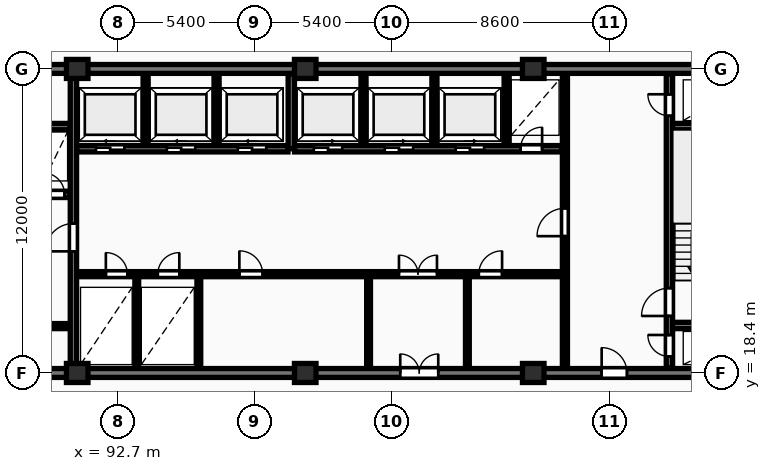
"""IFC4 building model, lengths in metres.
Left out: names, types, materials, properties, quantities, classifications, styles, units other than length and angle.
Written with IfcOpenShell. Run it as: python <this file> out.ifc"""

import sys

from ifc_helpers import new_model, si_unit, direction, frame, frame_2d, origin, origin_2d, place, context, subcontext, project, spatial, rectangle, extrude, element, fill, save


model = new_model("IFC4")
c1 = context("Model", 3, precision=1e-05, world=origin(), true_north=direction((0.0, 1.0)))
c2 = subcontext(c1, "Body", "Model", "MODEL_VIEW")
j1 = project(units=[si_unit("LENGTHUNIT", "METRE"), si_unit("PLANEANGLEUNIT", "RADIAN")], contexts=[c1])
p1 = place(None, origin())
s1 = spatial("IfcSite", under=j1, at=p1, CompositionType="ELEMENT")
p2 = place(p1, origin())
s2 = spatial("IfcBuilding", under=s1, at=p2, CompositionType="ELEMENT")
p3 = place(p2, frame((0.0, 0.0, 93.8)))
s3 = spatial("IfcBuildingStorey", under=s2, at=p3, CompositionType="ELEMENT", Elevation=93.8)
for number, where, z_axis, x_axis in (
    (1, (91.1, 18.4, 0.0), (0.0, 0.0, 1.0), (1.0, 0.0, 0.0)),
    (2, (91.1, 30.4, 0.0), (0.0, 0.0, 1.0), (1.0, 0.0, 0.0)),
    (3, (100.1, 18.4, 0.0), (0.0, 0.0, 1.0), (1.0, 0.0, 0.0)),
    (4, (100.1, 30.4, 0.0), (0.0, 0.0, 1.0), (1.0, 0.0, 0.0)),
    (5, (109.1, 18.4, 0.0), (0.0, 0.0, 1.0), (1.0, 0.0, 0.0)),
    (6, (109.1, 30.4, 0.0), (0.0, 0.0, 1.0), (1.0, 0.0, 0.0)),
):
    element("IfcColumn", number, at=place(p3, frame(where, z_axis=z_axis, x_axis=x_axis)), inside=s3, PredefinedType="COLUMN", context=c2, shape_type="SweptSolid", body=[
        extrude(rectangle(XDim=0.85, YDim=0.75, at=origin_2d()), origin(), (0.0, 0.0, 1.0), 3.25),
    ])
p4 = place(p3, frame((81.925, 30.4, 0.0), z_axis=(0.0, 0.0, 1.0), x_axis=(1.0, 0.0, 0.0)))
e7 = element("IfcWall", 7, at=p4, inside=s3, PredefinedType="SHEAR", context=c2, shape_type="SweptSolid", body=[
    extrude(rectangle(XDim=36.265, YDim=0.35, at=frame_2d((18.132, 0.0))), origin(), (0.0, 0.0, 1.0), 3.25),
])
p5 = place(p3, frame((81.925, 18.4, 0.0), z_axis=(0.0, 0.0, 1.0), x_axis=(1.0, 0.0, 0.0)))
e8 = element("IfcWall", 8, at=p5, inside=s3, PredefinedType="SHEAR", context=c2, shape_type="SweptSolid", body=[
    extrude(rectangle(XDim=36.265, YDim=0.35, at=frame_2d((18.132, 0.0))), origin(), (0.0, 0.0, 1.0), 3.25),
])
p6 = place(p5, frame((5.675, 0.0, 0.0)))
e9 = element("IfcOpeningElement", 9, at=p6, cuts=e8, PredefinedType="OPENING", context=c2, shape_type="SweptSolid", body=[
    extrude(rectangle(XDim=1.0, YDim=2.15, at=frame_2d((0.5, 1.075))), frame((0.0, 0.185, 0.0), z_axis=(0.0, -1.0, 0.0), x_axis=(1.0, 0.0, 0.0)), (0.0, 0.0, 1.0), 0.37),
])
p7 = place(p5, frame((21.925, 0.0, 0.0)))
e10 = element("IfcOpeningElement", 10, at=p7, cuts=e8, PredefinedType="OPENING", context=c2, shape_type="SweptSolid", body=[
    extrude(rectangle(XDim=1.5, YDim=2.2, at=frame_2d((0.75, 1.1))), frame((0.0, 0.185, 0.0), z_axis=(0.0, -1.0, 0.0), x_axis=(1.0, 0.0, 0.0)), (0.0, 0.0, 1.0), 0.37),
])
p8 = place(p5, frame((29.875, 0.0, 0.0)))
e11 = element("IfcOpeningElement", 11, at=p8, cuts=e8, PredefinedType="OPENING", context=c2, shape_type="SweptSolid", body=[
    extrude(rectangle(XDim=1.0, YDim=2.15, at=frame_2d((0.5, 1.075))), frame((0.0, 0.185, 0.0), z_axis=(0.0, -1.0, 0.0), x_axis=(1.0, 0.0, 0.0)), (0.0, 0.0, 1.0), 0.37),
])
p9 = place(p3, frame((83.0, 28.125, 0.0), z_axis=(0.0, 0.0, 1.0), x_axis=(1.0, 0.0, 0.0)))
e12 = element("IfcWall", 12, at=p9, inside=s3, PredefinedType="SHEAR", context=c2, shape_type="SweptSolid", body=[
    extrude(rectangle(XDim=7.82, YDim=0.25, at=frame_2d((3.91, 0.0))), origin(), (0.0, 0.0, 1.0), 3.25),
])
p10 = place(p3, frame((86.5, 25.45, 0.0), z_axis=(0.0, 0.0, 1.0), x_axis=(1.0, 0.0, 0.0)))
e13 = element("IfcWall", 13, at=p10, inside=s3, PredefinedType="SHEAR", context=c2, shape_type="SweptSolid", body=[
    extrude(rectangle(XDim=4.32, YDim=0.25, at=frame_2d((2.16, 0.0))), origin(), (0.0, 0.0, 1.0), 3.25),
])
p11 = place(p10, frame((1.14, 0.0, 0.0)))
e14 = element("IfcOpeningElement", 14, at=p11, cuts=e13, PredefinedType="OPENING", context=c2, shape_type="SweptSolid", body=[
    extrude(rectangle(XDim=1.12, YDim=2.12, at=frame_2d((0.56, 1.06))), frame((0.0, 0.135, 0.0), z_axis=(0.0, -1.0, 0.0), x_axis=(1.0, 0.0, 0.0)), (0.0, 0.0, 1.0), 0.27),
])
p12 = place(p10, frame((3.25, 0.0, 0.0)))
e15 = element("IfcOpeningElement", 15, at=p12, cuts=e13, PredefinedType="OPENING", context=c2, shape_type="SweptSolid", body=[
    extrude(rectangle(XDim=0.85, YDim=2.05, at=frame_2d((0.425, 1.025))), frame((0.0, 0.135, 0.0), z_axis=(0.0, -1.0, 0.0), x_axis=(1.0, 0.0, 0.0)), (0.0, 0.0, 1.0), 0.27),
])
p13 = place(p3, frame((86.5, 20.25, 0.0), z_axis=(0.0, 0.0, 1.0), x_axis=(1.0, 0.0, 0.0)))
e16 = element("IfcWall", 16, at=p13, inside=s3, PredefinedType="PARTITIONING", context=c2, shape_type="SweptSolid", body=[
    extrude(rectangle(XDim=4.32, YDim=0.2, at=frame_2d((2.16, 0.0))), origin(), (0.0, 0.0, 1.0), 2.97),
])
p14 = place(p13, frame((1.4, 0.0, 0.0)))
e17 = element("IfcOpeningElement", 17, at=p14, cuts=e16, PredefinedType="OPENING", context=c2, shape_type="SweptSolid", body=[
    extrude(rectangle(XDim=1.1, YDim=2.1, at=frame_2d((0.55, 1.05))), frame((0.0, 0.11, 0.0), z_axis=(0.0, -1.0, 0.0), x_axis=(1.0, 0.0, 0.0)), (0.0, 0.0, 1.0), 0.22),
])
p15 = place(p3, frame((90.95, 18.6, 0.0), z_axis=(0.0, 0.0, 1.0), x_axis=(0.0, 1.0, 0.0)))
e18 = element("IfcWall", 18, at=p15, inside=s3, PredefinedType="SHEAR", context=c2, shape_type="SweptSolid", body=[
    extrude(rectangle(XDim=11.6, YDim=0.25, at=frame_2d((5.8, 0.0))), origin(), (0.0, 0.0, 1.0), 3.25),
])
p16 = place(p15, frame((4.6, 0.0, 0.0)))
e19 = element("IfcOpeningElement", 19, at=p16, cuts=e18, PredefinedType="OPENING", context=c2, shape_type="SweptSolid", body=[
    extrude(rectangle(XDim=1.1, YDim=2.1, at=frame_2d((0.55, 1.05))), frame((0.0, 0.135, 0.0), z_axis=(0.0, -1.0, 0.0), x_axis=(1.0, 0.0, 0.0)), (0.0, 0.0, 1.0), 0.27),
])
for number, where, z_axis, x_axis in (
    (20, (93.8, 27.38, 0.0), (0.0, 0.0, 1.0), (0.0, 1.0, 0.0)),
    (21, (96.6, 27.38, 0.0), (0.0, 0.0, 1.0), (0.0, 1.0, 0.0)),
):
    element("IfcWall", number, at=place(p3, frame(where, z_axis=z_axis, x_axis=x_axis)), inside=s3, PredefinedType="PARTITIONING", context=c2, shape_type="SweptSolid", body=[
        extrude(rectangle(XDim=2.82, YDim=0.2, at=frame_2d((1.41, 0.0))), origin(), (0.0, 0.0, 1.0), 2.97),
    ])
p17 = place(p3, frame((91.08, 27.25, 0.0), z_axis=(0.0, 0.0, 1.0), x_axis=(1.0, 0.0, 0.0)))
e22 = element("IfcWall", 22, at=p17, inside=s3, PredefinedType="SHEAR", context=c2, shape_type="SweptSolid", body=[
    extrude(rectangle(XDim=8.34, YDim=0.25, at=frame_2d((4.17, 0.0))), origin(), (0.0, 0.0, 1.0), 3.25),
])
p18 = place(p17, frame((0.76, 0.0, 0.0)))
e23 = element("IfcOpeningElement", 23, at=p18, cuts=e22, PredefinedType="OPENING", context=c2, shape_type="SweptSolid", body=[
    extrude(rectangle(XDim=1.12, YDim=2.12, at=frame_2d((0.56, 1.06))), frame((0.0, 0.135, 0.0), z_axis=(0.0, -1.0, 0.0), x_axis=(1.0, 0.0, 0.0)), (0.0, 0.0, 1.0), 0.27),
])
p19 = place(p17, frame((3.56, 0.0, 0.0)))
e24 = element("IfcOpeningElement", 24, at=p19, cuts=e22, PredefinedType="OPENING", context=c2, shape_type="SweptSolid", body=[
    extrude(rectangle(XDim=1.12, YDim=2.12, at=frame_2d((0.56, 1.06))), frame((0.0, 0.135, 0.0), z_axis=(0.0, -1.0, 0.0), x_axis=(1.0, 0.0, 0.0)), (0.0, 0.0, 1.0), 0.27),
])
p20 = place(p17, frame((6.36, 0.0, 0.0)))
e25 = element("IfcOpeningElement", 25, at=p20, cuts=e22, PredefinedType="OPENING", context=c2, shape_type="SweptSolid", body=[
    extrude(rectangle(XDim=1.12, YDim=2.12, at=frame_2d((0.56, 1.06))), frame((0.0, 0.135, 0.0), z_axis=(0.0, -1.0, 0.0), x_axis=(1.0, 0.0, 0.0)), (0.0, 0.0, 1.0), 0.27),
])
p21 = place(p3, frame((99.55, 27.25, 0.0), z_axis=(0.0, 0.0, 1.0), x_axis=(0.0, 1.0, 0.0)))
e26 = element("IfcWall", 26, at=p21, inside=s3, PredefinedType="SHEAR", context=c2, shape_type="SweptSolid", body=[
    extrude(rectangle(XDim=2.95, YDim=0.25, at=frame_2d((1.475, 0.0))), origin(), (0.0, 0.0, 1.0), 3.25),
])
for number, where, z_axis, x_axis in (
    (27, (102.4, 27.38, 0.0), (0.0, 0.0, 1.0), (0.0, 1.0, 0.0)),
    (28, (105.2, 27.38, 0.0), (0.0, 0.0, 1.0), (0.0, 1.0, 0.0)),
    (29, (108.05, 27.38, 0.0), (0.0, 0.0, 1.0), (0.0, 1.0, 0.0)),
):
    element("IfcWall", number, at=place(p3, frame(where, z_axis=z_axis, x_axis=x_axis)), inside=s3, PredefinedType="PARTITIONING", context=c2, shape_type="SweptSolid", body=[
        extrude(rectangle(XDim=2.82, YDim=0.2, at=frame_2d((1.41, 0.0))), origin(), (0.0, 0.0, 1.0), 2.97),
    ])
p22 = place(p3, frame((99.68, 27.25, 0.0), z_axis=(0.0, 0.0, 1.0), x_axis=(1.0, 0.0, 0.0)))
e30 = element("IfcWall", 30, at=p22, inside=s3, PredefinedType="SHEAR", context=c2, shape_type="SweptSolid", body=[
    extrude(rectangle(XDim=10.54, YDim=0.25, at=frame_2d((5.27, 0.0))), origin(), (0.0, 0.0, 1.0), 3.25),
])
p23 = place(p22, frame((0.76, 0.0, 0.0)))
e31 = element("IfcOpeningElement", 31, at=p23, cuts=e30, PredefinedType="OPENING", context=c2, shape_type="SweptSolid", body=[
    extrude(rectangle(XDim=1.12, YDim=2.12, at=frame_2d((0.56, 1.06))), frame((0.0, 0.135, 0.0), z_axis=(0.0, -1.0, 0.0), x_axis=(1.0, 0.0, 0.0)), (0.0, 0.0, 1.0), 0.27),
])
p24 = place(p22, frame((3.56, 0.0, 0.0)))
e32 = element("IfcOpeningElement", 32, at=p24, cuts=e30, PredefinedType="OPENING", context=c2, shape_type="SweptSolid", body=[
    extrude(rectangle(XDim=1.12, YDim=2.12, at=frame_2d((0.56, 1.06))), frame((0.0, 0.135, 0.0), z_axis=(0.0, -1.0, 0.0), x_axis=(1.0, 0.0, 0.0)), (0.0, 0.0, 1.0), 0.27),
])
p25 = place(p22, frame((6.36, 0.0, 0.0)))
e33 = element("IfcOpeningElement", 33, at=p25, cuts=e30, PredefinedType="OPENING", context=c2, shape_type="SweptSolid", body=[
    extrude(rectangle(XDim=1.12, YDim=2.12, at=frame_2d((0.56, 1.06))), frame((0.0, 0.135, 0.0), z_axis=(0.0, -1.0, 0.0), x_axis=(1.0, 0.0, 0.0)), (0.0, 0.0, 1.0), 0.27),
])
p26 = place(p22, frame((8.92, 0.0, 0.0)))
e34 = element("IfcOpeningElement", 34, at=p26, cuts=e30, PredefinedType="OPENING", context=c2, shape_type="SweptSolid", body=[
    extrude(rectangle(XDim=0.85, YDim=2.05, at=frame_2d((0.425, 1.025))), frame((0.0, 0.135, 0.0), z_axis=(0.0, -1.0, 0.0), x_axis=(1.0, 0.0, 0.0)), (0.0, 0.0, 1.0), 0.27),
])
for number, where, z_axis, x_axis in (
    (35, (93.45, 18.6, 0.0), (0.0, 0.0, 1.0), (0.0, 1.0, 0.0)),
    (36, (95.9, 18.6, 0.0), (0.0, 0.0, 1.0), (0.0, 1.0, 0.0)),
    (37, (102.6, 18.6, 0.0), (0.0, 0.0, 1.0), (0.0, 1.0, 0.0)),
    (38, (106.5, 18.6, 0.0), (0.0, 0.0, 1.0), (0.0, 1.0, 0.0)),
):
    element("IfcWall", number, at=place(p3, frame(where, z_axis=z_axis, x_axis=x_axis)), inside=s3, PredefinedType="PARTITIONING", context=c2, shape_type="SweptSolid", body=[
        extrude(rectangle(XDim=3.6, YDim=0.15, at=frame_2d((1.8, 0.0))), origin(), (0.0, 0.0, 1.0), 2.97),
    ])
p27 = place(p3, frame((91.08, 22.3, 0.0), z_axis=(0.0, 0.0, 1.0), x_axis=(1.0, 0.0, 0.0)))
e39 = element("IfcWall", 39, at=p27, inside=s3, PredefinedType="PARTITIONING", context=c2, shape_type="SweptSolid", body=[
    extrude(rectangle(XDim=19.14, YDim=0.2, at=frame_2d((9.57, 0.0))), origin(), (0.0, 0.0, 1.0), 2.97),
])
p28 = place(p27, frame((1.15, 0.0, 0.0)))
e40 = element("IfcOpeningElement", 40, at=p28, cuts=e39, PredefinedType="OPENING", context=c2, shape_type="SweptSolid", body=[
    extrude(rectangle(XDim=0.85, YDim=2.05, at=frame_2d((0.425, 1.025))), frame((0.0, 0.11, 0.0), z_axis=(0.0, -1.0, 0.0), x_axis=(1.0, 0.0, 0.0)), (0.0, 0.0, 1.0), 0.22),
])
p29 = place(p27, frame((3.2, 0.0, 0.0)))
e41 = element("IfcOpeningElement", 41, at=p29, cuts=e39, PredefinedType="OPENING", context=c2, shape_type="SweptSolid", body=[
    extrude(rectangle(XDim=0.85, YDim=2.05, at=frame_2d((0.425, 1.025))), frame((0.0, 0.11, 0.0), z_axis=(0.0, -1.0, 0.0), x_axis=(1.0, 0.0, 0.0)), (0.0, 0.0, 1.0), 0.22),
])
p30 = place(p27, frame((12.72, 0.0, 0.0)))
e42 = element("IfcOpeningElement", 42, at=p30, cuts=e39, PredefinedType="OPENING", context=c2, shape_type="SweptSolid", body=[
    extrude(rectangle(XDim=1.5, YDim=2.2, at=frame_2d((0.75, 1.1))), frame((0.0, 0.11, 0.0), z_axis=(0.0, -1.0, 0.0), x_axis=(1.0, 0.0, 0.0)), (0.0, 0.0, 1.0), 0.22),
])
p31 = place(p27, frame((6.42, 0.0, 0.0)))
e43 = element("IfcOpeningElement", 43, at=p31, cuts=e39, PredefinedType="OPENING", context=c2, shape_type="SweptSolid", body=[
    extrude(rectangle(XDim=0.92, YDim=2.08, at=frame_2d((0.46, 1.04))), frame((0.0, 0.11, 0.0), z_axis=(0.0, -1.0, 0.0), x_axis=(1.0, 0.0, 0.0)), (0.0, 0.0, 1.0), 0.22),
])
p32 = place(p27, frame((15.87, 0.0, 0.0)))
e44 = element("IfcOpeningElement", 44, at=p32, cuts=e39, PredefinedType="OPENING", context=c2, shape_type="SweptSolid", body=[
    extrude(rectangle(XDim=0.92, YDim=2.08, at=frame_2d((0.46, 1.04))), frame((0.0, 0.11, 0.0), z_axis=(0.0, -1.0, 0.0), x_axis=(1.0, 0.0, 0.0)), (0.0, 0.0, 1.0), 0.22),
])
p33 = place(p3, frame((110.35, 18.6, 0.0), z_axis=(0.0, 0.0, 1.0), x_axis=(0.0, 1.0, 0.0)))
e45 = element("IfcWall", 45, at=p33, inside=s3, PredefinedType="PARTITIONING", context=c2, shape_type="SweptSolid", body=[
    extrude(rectangle(XDim=11.6, YDim=0.2, at=frame_2d((5.8, 0.0))), origin(), (0.0, 0.0, 1.0), 2.97),
])
p34 = place(p33, frame((5.2, 0.0, 0.0)))
e46 = element("IfcOpeningElement", 46, at=p34, cuts=e45, PredefinedType="OPENING", context=c2, shape_type="SweptSolid", body=[
    extrude(rectangle(XDim=1.1, YDim=2.15, at=frame_2d((0.55, 1.075))), frame((0.0, 0.11, 0.0), z_axis=(0.0, -1.0, 0.0), x_axis=(1.0, 0.0, 0.0)), (0.0, 0.0, 1.0), 0.22),
])
p35 = place(p3, frame((114.475, 18.6, 0.0), z_axis=(0.0, 0.0, 1.0), x_axis=(0.0, 1.0, 0.0)))
e47 = element("IfcWall", 47, at=p35, inside=s3, PredefinedType="SHEAR", context=c2, shape_type="SweptSolid", body=[
    extrude(rectangle(XDim=11.6, YDim=0.25, at=frame_2d((5.8, 0.0))), origin(), (0.0, 0.0, 1.0), 3.25),
])
p36 = place(p35, frame((0.45, 0.0, 0.0)))
e48 = element("IfcOpeningElement", 48, at=p36, cuts=e47, PredefinedType="OPENING", context=c2, shape_type="SweptSolid", body=[
    extrude(rectangle(XDim=0.85, YDim=2.05, at=frame_2d((0.425, 1.025))), frame((0.0, 0.135, 0.0), z_axis=(0.0, -1.0, 0.0), x_axis=(1.0, 0.0, 0.0)), (0.0, 0.0, 1.0), 0.27),
])
p37 = place(p35, frame((2.05, 0.0, 0.0)))
e49 = element("IfcOpeningElement", 49, at=p37, cuts=e47, PredefinedType="OPENING", context=c2, shape_type="SweptSolid", body=[
    extrude(rectangle(XDim=1.1, YDim=2.1, at=frame_2d((0.55, 1.05))), frame((0.0, 0.135, 0.0), z_axis=(0.0, -1.0, 0.0), x_axis=(1.0, 0.0, 0.0)), (0.0, 0.0, 1.0), 0.27),
])
p38 = place(p35, frame((9.95, 0.0, 0.0)))
e50 = element("IfcOpeningElement", 50, at=p38, cuts=e47, PredefinedType="OPENING", context=c2, shape_type="SweptSolid", body=[
    extrude(rectangle(XDim=0.85, YDim=2.05, at=frame_2d((0.425, 1.025))), frame((0.0, 0.135, 0.0), z_axis=(0.0, -1.0, 0.0), x_axis=(1.0, 0.0, 0.0)), (0.0, 0.0, 1.0), 0.27),
])
for number, where, z_axis, x_axis in (
    (51, (114.6, 20.275, 0.0), (0.0, 0.0, 1.0), (1.0, 0.0, 0.0)),
    (52, (114.6, 28.125, 0.0), (0.0, 0.0, 1.0), (1.0, 0.0, 0.0)),
):
    element("IfcWall", number, at=place(p3, frame(where, z_axis=z_axis, x_axis=x_axis)), inside=s3, PredefinedType="SHEAR", context=c2, shape_type="SweptSolid", body=[
        extrude(rectangle(XDim=3.24, YDim=0.25, at=frame_2d((1.62, 0.0))), origin(), (0.0, 0.0, 1.0), 3.25),
    ])
p39 = place(p7, origin())
e53 = element("IfcDoor", 53, at=p39, inside=s3, OperationType="DOUBLE_DOOR_SINGLE_SWING", PredefinedType="DOOR", context=c2, shape_type="SweptSolid", body=[
    extrude(rectangle(XDim=1.5, YDim=2.2, at=frame_2d((0.75, 1.1))), frame((0.0, 0.025, 0.0), z_axis=(0.0, -1.0, 0.0), x_axis=(1.0, 0.0, 0.0)), (0.0, 0.0, 1.0), 0.05),
])
fill(e10, e53)
p40 = place(p8, origin())
e54 = element("IfcDoor", 54, at=p40, inside=s3, OperationType="SINGLE_SWING_LEFT", PredefinedType="DOOR", context=c2, shape_type="SweptSolid", body=[
    extrude(rectangle(XDim=1.0, YDim=2.15, at=frame_2d((0.5, 1.075))), frame((0.0, 0.025, 0.0), z_axis=(0.0, -1.0, 0.0), x_axis=(1.0, 0.0, 0.0)), (0.0, 0.0, 1.0), 0.05),
])
fill(e11, e54)
p41 = place(p12, origin())
e55 = element("IfcDoor", 55, at=p41, inside=s3, OperationType="SINGLE_SWING_LEFT", PredefinedType="DOOR", context=c2, shape_type="SweptSolid", body=[
    extrude(rectangle(XDim=0.85, YDim=2.05, at=frame_2d((0.425, 1.025))), frame((0.0, 0.025, 0.0), z_axis=(0.0, -1.0, 0.0), x_axis=(1.0, 0.0, 0.0)), (0.0, 0.0, 1.0), 0.05),
])
fill(e15, e55)
p42 = place(p16, origin())
e56 = element("IfcDoor", 56, at=p42, inside=s3, OperationType="SINGLE_SWING_LEFT", PredefinedType="DOOR", context=c2, shape_type="SweptSolid", body=[
    extrude(rectangle(XDim=1.1, YDim=2.1, at=frame_2d((0.55, 1.05))), frame((0.0, 0.025, 0.0), z_axis=(0.0, -1.0, 0.0), x_axis=(1.0, 0.0, 0.0)), (0.0, 0.0, 1.0), 0.05),
])
fill(e19, e56)
p43 = place(p18, origin())
e57 = element("IfcDoor", 57, at=p43, inside=s3, OperationType="SLIDING_TO_LEFT", PredefinedType="DOOR", context=c2, shape_type="SweptSolid", body=[
    extrude(rectangle(XDim=1.12, YDim=2.12, at=frame_2d((0.56, 1.06))), frame((0.0, 0.025, 0.0), z_axis=(0.0, -1.0, 0.0), x_axis=(1.0, 0.0, 0.0)), (0.0, 0.0, 1.0), 0.05),
])
fill(e23, e57)
p44 = place(p19, origin())
e58 = element("IfcDoor", 58, at=p44, inside=s3, OperationType="SLIDING_TO_LEFT", PredefinedType="DOOR", context=c2, shape_type="SweptSolid", body=[
    extrude(rectangle(XDim=1.12, YDim=2.12, at=frame_2d((0.56, 1.06))), frame((0.0, 0.025, 0.0), z_axis=(0.0, -1.0, 0.0), x_axis=(1.0, 0.0, 0.0)), (0.0, 0.0, 1.0), 0.05),
])
fill(e24, e58)
p45 = place(p20, origin())
e59 = element("IfcDoor", 59, at=p45, inside=s3, OperationType="SLIDING_TO_LEFT", PredefinedType="DOOR", context=c2, shape_type="SweptSolid", body=[
    extrude(rectangle(XDim=1.12, YDim=2.12, at=frame_2d((0.56, 1.06))), frame((0.0, 0.025, 0.0), z_axis=(0.0, -1.0, 0.0), x_axis=(1.0, 0.0, 0.0)), (0.0, 0.0, 1.0), 0.05),
])
fill(e25, e59)
p46 = place(p23, origin())
e60 = element("IfcDoor", 60, at=p46, inside=s3, OperationType="SLIDING_TO_RIGHT", PredefinedType="DOOR", context=c2, shape_type="SweptSolid", body=[
    extrude(rectangle(XDim=1.12, YDim=2.12, at=frame_2d((0.56, 1.06))), frame((0.0, 0.025, 0.0), z_axis=(0.0, -1.0, 0.0), x_axis=(1.0, 0.0, 0.0)), (0.0, 0.0, 1.0), 0.05),
])
fill(e31, e60)
p47 = place(p24, origin())
e61 = element("IfcDoor", 61, at=p47, inside=s3, OperationType="SLIDING_TO_RIGHT", PredefinedType="DOOR", context=c2, shape_type="SweptSolid", body=[
    extrude(rectangle(XDim=1.12, YDim=2.12, at=frame_2d((0.56, 1.06))), frame((0.0, 0.025, 0.0), z_axis=(0.0, -1.0, 0.0), x_axis=(1.0, 0.0, 0.0)), (0.0, 0.0, 1.0), 0.05),
])
fill(e32, e61)
p48 = place(p25, origin())
e62 = element("IfcDoor", 62, at=p48, inside=s3, OperationType="SLIDING_TO_RIGHT", PredefinedType="DOOR", context=c2, shape_type="SweptSolid", body=[
    extrude(rectangle(XDim=1.12, YDim=2.12, at=frame_2d((0.56, 1.06))), frame((0.0, 0.025, 0.0), z_axis=(0.0, -1.0, 0.0), x_axis=(1.0, 0.0, 0.0)), (0.0, 0.0, 1.0), 0.05),
])
fill(e33, e62)
p49 = place(p26, origin())
e63 = element("IfcDoor", 63, at=p49, inside=s3, OperationType="SINGLE_SWING_RIGHT", PredefinedType="DOOR", context=c2, shape_type="SweptSolid", body=[
    extrude(rectangle(XDim=0.85, YDim=2.05, at=frame_2d((0.425, 1.025))), frame((0.0, 0.025, 0.0), z_axis=(0.0, -1.0, 0.0), x_axis=(1.0, 0.0, 0.0)), (0.0, 0.0, 1.0), 0.05),
])
fill(e34, e63)
p50 = place(p28, origin())
e64 = element("IfcDoor", 64, at=p50, inside=s3, OperationType="SINGLE_SWING_LEFT", PredefinedType="DOOR", context=c2, shape_type="SweptSolid", body=[
    extrude(rectangle(XDim=0.85, YDim=2.05, at=frame_2d((0.425, 1.025))), frame((0.0, 0.025, 0.0), z_axis=(0.0, -1.0, 0.0), x_axis=(1.0, 0.0, 0.0)), (0.0, 0.0, 1.0), 0.05),
])
fill(e40, e64)
p51 = place(p29, origin())
e65 = element("IfcDoor", 65, at=p51, inside=s3, OperationType="SINGLE_SWING_RIGHT", PredefinedType="DOOR", context=c2, shape_type="SweptSolid", body=[
    extrude(rectangle(XDim=0.85, YDim=2.05, at=frame_2d((0.425, 1.025))), frame((0.0, 0.025, 0.0), z_axis=(0.0, -1.0, 0.0), x_axis=(1.0, 0.0, 0.0)), (0.0, 0.0, 1.0), 0.05),
])
fill(e41, e65)
p52 = place(p30, origin())
e66 = element("IfcDoor", 66, at=p52, inside=s3, OperationType="DOUBLE_DOOR_SINGLE_SWING", PredefinedType="DOOR", context=c2, shape_type="SweptSolid", body=[
    extrude(rectangle(XDim=1.5, YDim=2.2, at=frame_2d((0.75, 1.1))), frame((0.0, 0.025, 0.0), z_axis=(0.0, -1.0, 0.0), x_axis=(1.0, 0.0, 0.0)), (0.0, 0.0, 1.0), 0.05),
])
fill(e42, e66)
p53 = place(p31, origin())
e67 = element("IfcDoor", 67, at=p53, inside=s3, OperationType="SINGLE_SWING_LEFT", PredefinedType="DOOR", context=c2, shape_type="SweptSolid", body=[
    extrude(rectangle(XDim=0.92, YDim=2.08, at=frame_2d((0.46, 1.04))), frame((0.0, 0.025, 0.0), z_axis=(0.0, -1.0, 0.0), x_axis=(1.0, 0.0, 0.0)), (0.0, 0.0, 1.0), 0.05),
])
fill(e43, e67)
p54 = place(p32, origin())
e68 = element("IfcDoor", 68, at=p54, inside=s3, OperationType="SINGLE_SWING_RIGHT", PredefinedType="DOOR", context=c2, shape_type="SweptSolid", body=[
    extrude(rectangle(XDim=0.92, YDim=2.08, at=frame_2d((0.46, 1.04))), frame((0.0, 0.025, 0.0), z_axis=(0.0, -1.0, 0.0), x_axis=(1.0, 0.0, 0.0)), (0.0, 0.0, 1.0), 0.05),
])
fill(e44, e68)
p55 = place(p34, origin())
e69 = element("IfcDoor", 69, at=p55, inside=s3, OperationType="SINGLE_SWING_LEFT", PredefinedType="DOOR", context=c2, shape_type="SweptSolid", body=[
    extrude(rectangle(XDim=1.1, YDim=2.15, at=frame_2d((0.55, 1.075))), frame((0.0, 0.025, 0.0), z_axis=(0.0, -1.0, 0.0), x_axis=(1.0, 0.0, 0.0)), (0.0, 0.0, 1.0), 0.05),
])
fill(e46, e69)
p56 = place(p36, origin())
e70 = element("IfcDoor", 70, at=p56, inside=s3, OperationType="SINGLE_SWING_RIGHT", PredefinedType="DOOR", context=c2, shape_type="SweptSolid", body=[
    extrude(rectangle(XDim=0.85, YDim=2.05, at=frame_2d((0.425, 1.025))), frame((0.0, 0.025, 0.0), z_axis=(0.0, -1.0, 0.0), x_axis=(1.0, 0.0, 0.0)), (0.0, 0.0, 1.0), 0.05),
])
fill(e48, e70)
p57 = place(p37, origin())
e71 = element("IfcDoor", 71, at=p57, inside=s3, OperationType="SINGLE_SWING_LEFT", PredefinedType="DOOR", context=c2, shape_type="SweptSolid", body=[
    extrude(rectangle(XDim=1.1, YDim=2.1, at=frame_2d((0.55, 1.05))), frame((0.0, 0.025, 0.0), z_axis=(0.0, -1.0, 0.0), x_axis=(1.0, 0.0, 0.0)), (0.0, 0.0, 1.0), 0.05),
])
fill(e49, e71)
p58 = place(p38, origin())
e72 = element("IfcDoor", 72, at=p58, inside=s3, OperationType="SINGLE_SWING_RIGHT", PredefinedType="DOOR", context=c2, shape_type="SweptSolid", body=[
    extrude(rectangle(XDim=0.85, YDim=2.05, at=frame_2d((0.425, 1.025))), frame((0.0, 0.025, 0.0), z_axis=(0.0, -1.0, 0.0), x_axis=(1.0, 0.0, 0.0)), (0.0, 0.0, 1.0), 0.05),
])
fill(e50, e72)
save(model, sys.argv[1])
